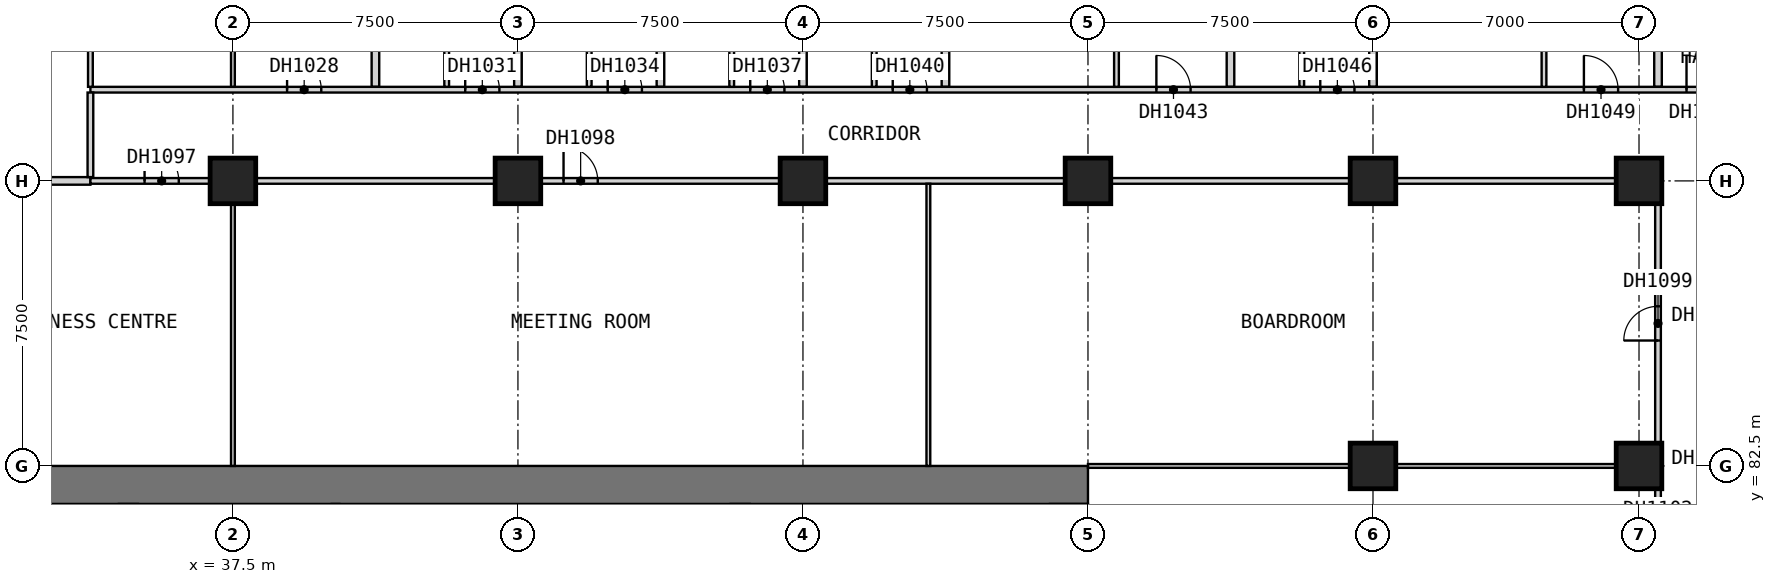
"""IFC4 building model, lengths in metres.
Left out: names, types, materials, properties, quantities, classifications, styles, units other than length and angle.
Written with IfcOpenShell. Run it as: python <this file> out.ifc"""

import sys

from ifc_helpers import new_model, si_unit, direction, frame, frame_2d, origin, origin_2d, place, context, subcontext, project, spatial, rectangle, extrude, element, fill, save


model = new_model("IFC4")
c1 = context("Model", 3, precision=1e-05, world=origin(), true_north=direction((0.0, 1.0)))
c2 = subcontext(c1, "Body", "Model", "MODEL_VIEW")
j1 = project(units=[si_unit("LENGTHUNIT", "METRE"), si_unit("PLANEANGLEUNIT", "RADIAN")], contexts=[c1])
p1 = place(None, origin())
s1 = spatial("IfcSite", under=j1, at=p1, CompositionType="ELEMENT")
p2 = place(p1, origin())
s2 = spatial("IfcBuilding", under=s1, at=p2, CompositionType="ELEMENT")
p3 = place(p2, frame((0.0, 0.0, 48.4)))
s3 = spatial("IfcBuildingStorey", under=s2, at=p3, CompositionType="ELEMENT", Elevation=48.4)
for number, where, z_axis, x_axis in (
    (1, (37.5, 90.0, 0.0), (0.0, 0.0, 1.0), (1.0, 0.0, 0.0)),
    (2, (45.0, 90.0, 0.0), (0.0, 0.0, 1.0), (1.0, 0.0, 0.0)),
    (3, (52.5, 90.0, 0.0), (0.0, 0.0, 1.0), (1.0, 0.0, 0.0)),
    (4, (60.0, 90.0, 0.0), (0.0, 0.0, 1.0), (1.0, 0.0, 0.0)),
    (5, (67.5, 82.5, 0.0), (0.0, 0.0, 1.0), (1.0, 0.0, 0.0)),
    (6, (67.5, 90.0, 0.0), (0.0, 0.0, 1.0), (1.0, 0.0, 0.0)),
    (7, (74.5, 82.5, 0.0), (0.0, 0.0, 1.0), (1.0, 0.0, 0.0)),
    (8, (74.5, 90.0, 0.0), (0.0, 0.0, 1.0), (1.0, 0.0, 0.0)),
):
    element("IfcColumn", number, at=place(p3, frame(where, z_axis=z_axis, x_axis=x_axis)), inside=s3, PredefinedType="COLUMN", context=c2, shape_type="SweptSolid", body=[
        extrude(rectangle(XDim=1.2, YDim=1.2, at=origin_2d()), origin(), (0.0, 0.0, 1.0), 3.6),
    ])
p4 = place(p3, frame((30.0, 82.0, 0.0), z_axis=(0.0, 0.0, 1.0), x_axis=(1.0, 0.0, 0.0)))
e9 = element("IfcWall", 9, at=p4, inside=s3, PredefinedType="SHEAR", context=c2, shape_type="SweptSolid", body=[
    extrude(rectangle(XDim=30.0, YDim=1.0, at=frame_2d((15.0, 0.0))), origin(), (0.0, 0.0, 1.0), 3.6),
])
for number, where, z_axis, x_axis in (
    (10, (34.75, 78.3, 0.0), (0.0, 0.0, 1.0), (0.0, 1.0, 0.0)),
    (11, (50.85, 78.3, 0.0), (0.0, 0.0, 1.0), (0.0, 1.0, 0.0)),
):
    element("IfcWall", number, at=place(p3, frame(where, z_axis=z_axis, x_axis=x_axis)), inside=s3, PredefinedType="SHEAR", context=c2, shape_type="SweptSolid", body=[
        extrude(rectangle(XDim=3.2, YDim=0.5, at=frame_2d((1.6, 0.0))), origin(), (0.0, 0.0, 1.0), 3.6),
    ])
p5 = place(p3, frame((30.0, 90.0, 0.0), z_axis=(0.0, 0.0, 1.0), x_axis=(1.0, 0.0, 0.0)))
e12 = element("IfcWall", 12, at=p5, inside=s3, PredefinedType="PARTITIONING", context=c2, shape_type="SweptSolid", body=[
    extrude(rectangle(XDim=3.75, YDim=0.2, at=frame_2d((1.875, 0.0))), origin(), (0.0, 0.0, 1.0), 3.35),
])
p6 = place(p3, frame((41.25, 92.475, 0.0), z_axis=(0.0, 0.0, 1.0), x_axis=(0.0, 1.0, 0.0)))
e13 = element("IfcWall", 13, at=p6, inside=s3, PredefinedType="PARTITIONING", context=c2, shape_type="SweptSolid", body=[
    extrude(rectangle(XDim=11.715, YDim=0.2, at=frame_2d((5.857, 0.0))), origin(), (0.0, 0.0, 1.0), 3.35),
])
p7 = place(p3, frame((45.0, 92.475, 0.0), z_axis=(0.0, 0.0, 1.0), x_axis=(0.0, 1.0, 0.0)))
e14 = element("IfcWall", 14, at=p7, inside=s3, PredefinedType="PARTITIONING", context=c2, shape_type="SweptSolid", body=[
    extrude(rectangle(XDim=12.525, YDim=0.2, at=frame_2d((6.262, 0.0))), origin(), (0.0, 0.0, 1.0), 3.35),
])
p8 = place(p3, frame((48.75, 92.475, 0.0), z_axis=(0.0, 0.0, 1.0), x_axis=(0.0, 1.0, 0.0)))
e15 = element("IfcWall", 15, at=p8, inside=s3, PredefinedType="PARTITIONING", context=c2, shape_type="SweptSolid", body=[
    extrude(rectangle(XDim=11.715, YDim=0.2, at=frame_2d((5.857, 0.0))), origin(), (0.0, 0.0, 1.0), 3.35),
])
p9 = place(p3, frame((52.5, 92.475, 0.0), z_axis=(0.0, 0.0, 1.0), x_axis=(0.0, 1.0, 0.0)))
e16 = element("IfcWall", 16, at=p9, inside=s3, PredefinedType="PARTITIONING", context=c2, shape_type="SweptSolid", body=[
    extrude(rectangle(XDim=12.525, YDim=0.2, at=frame_2d((6.262, 0.0))), origin(), (0.0, 0.0, 1.0), 3.35),
])
for number, where, z_axis, x_axis in (
    (17, (56.25, 92.475, 0.0), (0.0, 0.0, 1.0), (0.0, 1.0, 0.0)),
    (18, (63.75, 92.475, 0.0), (0.0, 0.0, 1.0), (0.0, 1.0, 0.0)),
):
    element("IfcWall", number, at=place(p3, frame(where, z_axis=z_axis, x_axis=x_axis)), inside=s3, PredefinedType="PARTITIONING", context=c2, shape_type="SweptSolid", body=[
        extrude(rectangle(XDim=11.715, YDim=0.2, at=frame_2d((5.857, 0.0))), origin(), (0.0, 0.0, 1.0), 3.35),
    ])
p10 = place(p3, frame((67.5, 92.475, 0.0), z_axis=(0.0, 0.0, 1.0), x_axis=(0.0, 1.0, 0.0)))
e19 = element("IfcWall", 19, at=p10, inside=s3, PredefinedType="PARTITIONING", context=c2, shape_type="SweptSolid", body=[
    extrude(rectangle(XDim=12.525, YDim=0.2, at=frame_2d((6.262, 0.0))), origin(), (0.0, 0.0, 1.0), 3.35),
])
p11 = place(p3, frame((75.0, 92.475, 0.0), z_axis=(0.0, 0.0, 1.0), x_axis=(0.0, 1.0, 0.0)))
e20 = element("IfcWall", 20, at=p11, inside=s3, PredefinedType="PARTITIONING", context=c2, shape_type="SweptSolid", body=[
    extrude(rectangle(XDim=11.715, YDim=0.2, at=frame_2d((5.857, 0.0))), origin(), (0.0, 0.0, 1.0), 3.35),
])
p12 = place(p3, frame((33.75, 90.0, 0.0), z_axis=(0.0, 0.0, 1.0), x_axis=(1.0, 0.0, 0.0)))
e21 = element("IfcWall", 21, at=p12, inside=s3, PredefinedType="PARTITIONING", context=c2, shape_type="SweptSolid", body=[
    extrude(rectangle(XDim=41.25, YDim=0.15, at=frame_2d((20.625, 0.0))), origin(), (0.0, 0.0, 1.0), 3.35),
])
p13 = place(p12, frame((1.425, 0.0, 0.0)))
e22 = element("IfcOpeningElement", 22, at=p13, cuts=e21, PredefinedType="OPENING", context=c2, shape_type="SweptSolid", body=[
    extrude(rectangle(XDim=0.9, YDim=2.1, at=frame_2d((0.45, 1.05))), frame((0.0, 0.085, 0.0), z_axis=(0.0, -1.0, 0.0), x_axis=(1.0, 0.0, 0.0)), (0.0, 0.0, 1.0), 0.17),
])
p14 = place(p12, frame((12.45, 0.0, 0.0)))
e23 = element("IfcOpeningElement", 23, at=p14, cuts=e21, PredefinedType="OPENING", context=c2, shape_type="SweptSolid", body=[
    extrude(rectangle(XDim=0.9, YDim=2.1, at=frame_2d((0.45, 1.05))), frame((0.0, 0.085, 0.0), z_axis=(0.0, -1.0, 0.0), x_axis=(1.0, 0.0, 0.0)), (0.0, 0.0, 1.0), 0.17),
])
p15 = place(p3, frame((33.75, 92.4, 0.0), z_axis=(0.0, 0.0, 1.0), x_axis=(1.0, 0.0, 0.0)))
e24 = element("IfcWall", 24, at=p15, inside=s3, PredefinedType="PARTITIONING", context=c2, shape_type="SweptSolid", body=[
    extrude(rectangle(XDim=43.65, YDim=0.15, at=frame_2d((21.825, 0.0))), origin(), (0.0, 0.0, 1.0), 3.35),
])
p16 = place(p15, frame((5.175, 0.0, 0.0)))
e25 = element("IfcOpeningElement", 25, at=p16, cuts=e24, PredefinedType="OPENING", context=c2, shape_type="SweptSolid", body=[
    extrude(rectangle(XDim=0.9, YDim=2.1, at=frame_2d((0.45, 1.05))), frame((0.0, 0.085, 0.0), z_axis=(0.0, -1.0, 0.0), x_axis=(1.0, 0.0, 0.0)), (0.0, 0.0, 1.0), 0.17),
])
p17 = place(p15, frame((9.863, 0.0, 0.0)))
e26 = element("IfcOpeningElement", 26, at=p17, cuts=e24, PredefinedType="OPENING", context=c2, shape_type="SweptSolid", body=[
    extrude(rectangle(XDim=0.9, YDim=2.1, at=frame_2d((0.45, 1.05))), frame((0.0, 0.085, 0.0), z_axis=(0.0, -1.0, 0.0), x_axis=(1.0, 0.0, 0.0)), (0.0, 0.0, 1.0), 0.17),
])
p18 = place(p15, frame((13.613, 0.0, 0.0)))
e27 = element("IfcOpeningElement", 27, at=p18, cuts=e24, PredefinedType="OPENING", context=c2, shape_type="SweptSolid", body=[
    extrude(rectangle(XDim=0.9, YDim=2.1, at=frame_2d((0.45, 1.05))), frame((0.0, 0.085, 0.0), z_axis=(0.0, -1.0, 0.0), x_axis=(1.0, 0.0, 0.0)), (0.0, 0.0, 1.0), 0.17),
])
p19 = place(p15, frame((17.363, 0.0, 0.0)))
e28 = element("IfcOpeningElement", 28, at=p19, cuts=e24, PredefinedType="OPENING", context=c2, shape_type="SweptSolid", body=[
    extrude(rectangle(XDim=0.9, YDim=2.1, at=frame_2d((0.45, 1.05))), frame((0.0, 0.085, 0.0), z_axis=(0.0, -1.0, 0.0), x_axis=(1.0, 0.0, 0.0)), (0.0, 0.0, 1.0), 0.17),
])
p20 = place(p15, frame((21.113, 0.0, 0.0)))
e29 = element("IfcOpeningElement", 29, at=p20, cuts=e24, PredefinedType="OPENING", context=c2, shape_type="SweptSolid", body=[
    extrude(rectangle(XDim=0.9, YDim=2.1, at=frame_2d((0.45, 1.05))), frame((0.0, 0.085, 0.0), z_axis=(0.0, -1.0, 0.0), x_axis=(1.0, 0.0, 0.0)), (0.0, 0.0, 1.0), 0.17),
])
p21 = place(p15, frame((28.05, 0.0, 0.0)))
e30 = element("IfcOpeningElement", 30, at=p21, cuts=e24, PredefinedType="OPENING", context=c2, shape_type="SweptSolid", body=[
    extrude(rectangle(XDim=0.9, YDim=2.1, at=frame_2d((0.45, 1.05))), frame((0.0, 0.085, 0.0), z_axis=(0.0, -1.0, 0.0), x_axis=(1.0, 0.0, 0.0)), (0.0, 0.0, 1.0), 0.17),
])
p22 = place(p15, frame((32.363, 0.0, 0.0)))
e31 = element("IfcOpeningElement", 31, at=p22, cuts=e24, PredefinedType="OPENING", context=c2, shape_type="SweptSolid", body=[
    extrude(rectangle(XDim=0.9, YDim=2.1, at=frame_2d((0.45, 1.05))), frame((0.0, 0.085, 0.0), z_axis=(0.0, -1.0, 0.0), x_axis=(1.0, 0.0, 0.0)), (0.0, 0.0, 1.0), 0.17),
])
p23 = place(p15, frame((39.3, 0.0, 0.0)))
e32 = element("IfcOpeningElement", 32, at=p23, cuts=e24, PredefinedType="OPENING", context=c2, shape_type="SweptSolid", body=[
    extrude(rectangle(XDim=0.9, YDim=2.1, at=frame_2d((0.45, 1.05))), frame((0.0, 0.085, 0.0), z_axis=(0.0, -1.0, 0.0), x_axis=(1.0, 0.0, 0.0)), (0.0, 0.0, 1.0), 0.17),
])
p24 = place(p15, frame((42.0, 0.0, 0.0)))
e33 = element("IfcOpeningElement", 33, at=p24, cuts=e24, PredefinedType="OPENING", context=c2, shape_type="SweptSolid", body=[
    extrude(rectangle(XDim=0.9, YDim=2.1, at=frame_2d((0.45, 1.05))), frame((0.0, 0.085, 0.0), z_axis=(0.0, -1.0, 0.0), x_axis=(1.0, 0.0, 0.0)), (0.0, 0.0, 1.0), 0.17),
])
p25 = place(p3, frame((33.75, 90.1, 0.0), z_axis=(0.0, 0.0, 1.0), x_axis=(0.0, 1.0, 0.0)))
e34 = element("IfcWall", 34, at=p25, inside=s3, PredefinedType="PARTITIONING", context=c2, shape_type="SweptSolid", body=[
    extrude(rectangle(XDim=2.225, YDim=0.15, at=frame_2d((1.112, 0.0))), origin(), (0.0, 0.0, 1.0), 3.35),
])
p26 = place(p3, frame((75.0, 78.075, 0.0), z_axis=(0.0, 0.0, 1.0), x_axis=(0.0, 1.0, 0.0)))
e35 = element("IfcWall", 35, at=p26, inside=s3, PredefinedType="PARTITIONING", context=c2, shape_type="SweptSolid", body=[
    extrude(rectangle(XDim=11.85, YDim=0.15, at=frame_2d((5.925, 0.0))), origin(), (0.0, 0.0, 1.0), 3.35),
])
p27 = place(p26, frame((7.725, 0.0, 0.0)))
e36 = element("IfcOpeningElement", 36, at=p27, cuts=e35, PredefinedType="OPENING", context=c2, shape_type="SweptSolid", body=[
    extrude(rectangle(XDim=0.9, YDim=2.1, at=frame_2d((0.45, 1.05))), frame((0.0, 0.085, 0.0), z_axis=(0.0, -1.0, 0.0), x_axis=(1.0, 0.0, 0.0)), (0.0, 0.0, 1.0), 0.17),
])
p28 = place(p26, frame((1.725, 0.0, 0.0)))
e37 = element("IfcOpeningElement", 37, at=p28, cuts=e35, PredefinedType="OPENING", context=c2, shape_type="SweptSolid", body=[
    extrude(rectangle(XDim=0.9, YDim=2.1, at=frame_2d((0.45, 1.05))), frame((0.0, 0.085, 0.0), z_axis=(0.0, -1.0, 0.0), x_axis=(1.0, 0.0, 0.0)), (0.0, 0.0, 1.0), 0.17),
])
p29 = place(p3, frame((60.0, 82.5, 0.0), z_axis=(0.0, 0.0, 1.0), x_axis=(1.0, 0.0, 0.0)))
e38 = element("IfcWall", 38, at=p29, inside=s3, PredefinedType="PARTITIONING", context=c2, shape_type="SweptSolid", body=[
    extrude(rectangle(XDim=14.925, YDim=0.1, at=frame_2d((7.462, 0.0))), origin(), (0.0, 0.0, 1.0), 3.35),
])
p30 = place(p3, frame((37.5, 82.5, 0.0), z_axis=(0.0, 0.0, 1.0), x_axis=(0.0, 1.0, 0.0)))
e39 = element("IfcWall", 39, at=p30, inside=s3, PredefinedType="PARTITIONING", context=c2, shape_type="SweptSolid", body=[
    extrude(rectangle(XDim=7.425, YDim=0.1, at=frame_2d((3.712, 0.0))), origin(), (0.0, 0.0, 1.0), 3.35),
])
p31 = place(p3, frame((37.5, 92.475, 0.0), z_axis=(0.0, 0.0, 1.0), x_axis=(0.0, 1.0, 0.0)))
e40 = element("IfcWall", 40, at=p31, inside=s3, PredefinedType="PARTITIONING", context=c2, shape_type="SweptSolid", body=[
    extrude(rectangle(XDim=4.225, YDim=0.1, at=frame_2d((2.112, 0.0))), origin(), (0.0, 0.0, 1.0), 3.35),
])
p32 = place(p31, frame((1.65, 0.0, 0.0)))
e41 = element("IfcOpeningElement", 41, at=p32, cuts=e40, PredefinedType="OPENING", context=c2, shape_type="SweptSolid", body=[
    extrude(rectangle(XDim=0.9, YDim=2.1, at=frame_2d((0.45, 1.05))), frame((0.0, 0.06, 0.0), z_axis=(0.0, -1.0, 0.0), x_axis=(1.0, 0.0, 0.0)), (0.0, 0.0, 1.0), 0.12),
])
p33 = place(p3, frame((55.8, 82.5, 0.0), z_axis=(0.0, 0.0, 1.0), x_axis=(0.0, 1.0, 0.0)))
e42 = element("IfcWall", 42, at=p33, inside=s3, PredefinedType="PARTITIONING", context=c2, shape_type="SweptSolid", body=[
    extrude(rectangle(XDim=7.425, YDim=0.1, at=frame_2d((3.712, 0.0))), origin(), (0.0, 0.0, 1.0), 3.35),
])
for number, where, z_axis, x_axis in (
    (43, (33.75, 92.475, 0.0), (0.0, 0.0, 1.0), (0.0, 1.0, 0.0)),
    (44, (43.125, 92.475, 0.0), (0.0, 0.0, 1.0), (0.0, 1.0, 0.0)),
    (45, (46.875, 92.475, 0.0), (0.0, 0.0, 1.0), (0.0, 1.0, 0.0)),
    (46, (50.625, 92.475, 0.0), (0.0, 0.0, 1.0), (0.0, 1.0, 0.0)),
    (47, (54.375, 92.475, 0.0), (0.0, 0.0, 1.0), (0.0, 1.0, 0.0)),
    (48, (60.75, 92.475, 0.0), (0.0, 0.0, 1.0), (0.0, 1.0, 0.0)),
    (49, (65.625, 92.475, 0.0), (0.0, 0.0, 1.0), (0.0, 1.0, 0.0)),
    (50, (72.0, 92.475, 0.0), (0.0, 0.0, 1.0), (0.0, 1.0, 0.0)),
):
    element("IfcWall", number, at=place(p3, frame(where, z_axis=z_axis, x_axis=x_axis)), inside=s3, PredefinedType="PARTITIONING", context=c2, shape_type="SweptSolid", body=[
        extrude(rectangle(XDim=4.212, YDim=0.125, at=frame_2d((2.106, 0.0))), origin(), (0.0, 0.0, 1.0), 3.35),
    ])
p34 = place(p16, origin())
e51 = element("IfcDoor", 51, at=p34, inside=s3, OperationType="SINGLE_SWING_LEFT", PredefinedType="DOOR", context=c2, shape_type="SweptSolid", body=[
    extrude(rectangle(XDim=0.9, YDim=2.1, at=frame_2d((0.45, 1.05))), frame((0.0, 0.025, 0.0), z_axis=(0.0, -1.0, 0.0), x_axis=(1.0, 0.0, 0.0)), (0.0, 0.0, 1.0), 0.05),
])
fill(e25, e51)
p35 = place(p17, origin())
e52 = element("IfcDoor", 52, at=p35, inside=s3, OperationType="SINGLE_SWING_LEFT", PredefinedType="DOOR", context=c2, shape_type="SweptSolid", body=[
    extrude(rectangle(XDim=0.9, YDim=2.1, at=frame_2d((0.45, 1.05))), frame((0.0, 0.025, 0.0), z_axis=(0.0, -1.0, 0.0), x_axis=(1.0, 0.0, 0.0)), (0.0, 0.0, 1.0), 0.05),
])
fill(e26, e52)
p36 = place(p18, origin())
e53 = element("IfcDoor", 53, at=p36, inside=s3, OperationType="SINGLE_SWING_LEFT", PredefinedType="DOOR", context=c2, shape_type="SweptSolid", body=[
    extrude(rectangle(XDim=0.9, YDim=2.1, at=frame_2d((0.45, 1.05))), frame((0.0, 0.025, 0.0), z_axis=(0.0, -1.0, 0.0), x_axis=(1.0, 0.0, 0.0)), (0.0, 0.0, 1.0), 0.05),
])
fill(e27, e53)
p37 = place(p19, origin())
e54 = element("IfcDoor", 54, at=p37, inside=s3, OperationType="SINGLE_SWING_LEFT", PredefinedType="DOOR", context=c2, shape_type="SweptSolid", body=[
    extrude(rectangle(XDim=0.9, YDim=2.1, at=frame_2d((0.45, 1.05))), frame((0.0, 0.025, 0.0), z_axis=(0.0, -1.0, 0.0), x_axis=(1.0, 0.0, 0.0)), (0.0, 0.0, 1.0), 0.05),
])
fill(e28, e54)
p38 = place(p20, origin())
e55 = element("IfcDoor", 55, at=p38, inside=s3, OperationType="SINGLE_SWING_LEFT", PredefinedType="DOOR", context=c2, shape_type="SweptSolid", body=[
    extrude(rectangle(XDim=0.9, YDim=2.1, at=frame_2d((0.45, 1.05))), frame((0.0, 0.025, 0.0), z_axis=(0.0, -1.0, 0.0), x_axis=(1.0, 0.0, 0.0)), (0.0, 0.0, 1.0), 0.05),
])
fill(e29, e55)
p39 = place(p21, origin())
e56 = element("IfcDoor", 56, at=p39, inside=s3, OperationType="SINGLE_SWING_LEFT", PredefinedType="DOOR", context=c2, shape_type="SweptSolid", body=[
    extrude(rectangle(XDim=0.9, YDim=2.1, at=frame_2d((0.45, 1.05))), frame((0.0, 0.025, 0.0), z_axis=(0.0, -1.0, 0.0), x_axis=(1.0, 0.0, 0.0)), (0.0, 0.0, 1.0), 0.05),
])
fill(e30, e56)
p40 = place(p22, origin())
e57 = element("IfcDoor", 57, at=p40, inside=s3, OperationType="SINGLE_SWING_LEFT", PredefinedType="DOOR", context=c2, shape_type="SweptSolid", body=[
    extrude(rectangle(XDim=0.9, YDim=2.1, at=frame_2d((0.45, 1.05))), frame((0.0, 0.025, 0.0), z_axis=(0.0, -1.0, 0.0), x_axis=(1.0, 0.0, 0.0)), (0.0, 0.0, 1.0), 0.05),
])
fill(e31, e57)
p41 = place(p23, origin())
e58 = element("IfcDoor", 58, at=p41, inside=s3, OperationType="SINGLE_SWING_LEFT", PredefinedType="DOOR", context=c2, shape_type="SweptSolid", body=[
    extrude(rectangle(XDim=0.9, YDim=2.1, at=frame_2d((0.45, 1.05))), frame((0.0, 0.025, 0.0), z_axis=(0.0, -1.0, 0.0), x_axis=(1.0, 0.0, 0.0)), (0.0, 0.0, 1.0), 0.05),
])
fill(e32, e58)
p42 = place(p24, origin())
e59 = element("IfcDoor", 59, at=p42, inside=s3, OperationType="SINGLE_SWING_RIGHT", PredefinedType="DOOR", context=c2, shape_type="SweptSolid", body=[
    extrude(rectangle(XDim=0.9, YDim=2.1, at=frame_2d((0.45, 1.05))), frame((0.0, 0.025, 0.0), z_axis=(0.0, -1.0, 0.0), x_axis=(1.0, 0.0, 0.0)), (0.0, 0.0, 1.0), 0.05),
])
fill(e33, e59)
p43 = place(p13, origin())
e60 = element("IfcDoor", 60, at=p43, inside=s3, OperationType="SINGLE_SWING_RIGHT", PredefinedType="DOOR", context=c2, shape_type="SweptSolid", body=[
    extrude(rectangle(XDim=0.9, YDim=2.1, at=frame_2d((0.45, 1.05))), frame((0.0, 0.025, 0.0), z_axis=(0.0, -1.0, 0.0), x_axis=(1.0, 0.0, 0.0)), (0.0, 0.0, 1.0), 0.05),
])
fill(e22, e60)
p44 = place(p14, origin())
e61 = element("IfcDoor", 61, at=p44, inside=s3, OperationType="SINGLE_SWING_RIGHT", PredefinedType="DOOR", context=c2, shape_type="SweptSolid", body=[
    extrude(rectangle(XDim=0.9, YDim=2.1, at=frame_2d((0.45, 1.05))), frame((0.0, 0.025, 0.0), z_axis=(0.0, -1.0, 0.0), x_axis=(1.0, 0.0, 0.0)), (0.0, 0.0, 1.0), 0.05),
])
fill(e23, e61)
p45 = place(p27, origin())
e62 = element("IfcDoor", 62, at=p45, inside=s3, OperationType="SINGLE_SWING_LEFT", PredefinedType="DOOR", context=c2, shape_type="SweptSolid", body=[
    extrude(rectangle(XDim=0.9, YDim=2.1, at=frame_2d((0.45, 1.05))), frame((0.0, 0.025, 0.0), z_axis=(0.0, -1.0, 0.0), x_axis=(1.0, 0.0, 0.0)), (0.0, 0.0, 1.0), 0.05),
])
fill(e36, e62)
save(model, sys.argv[1])
